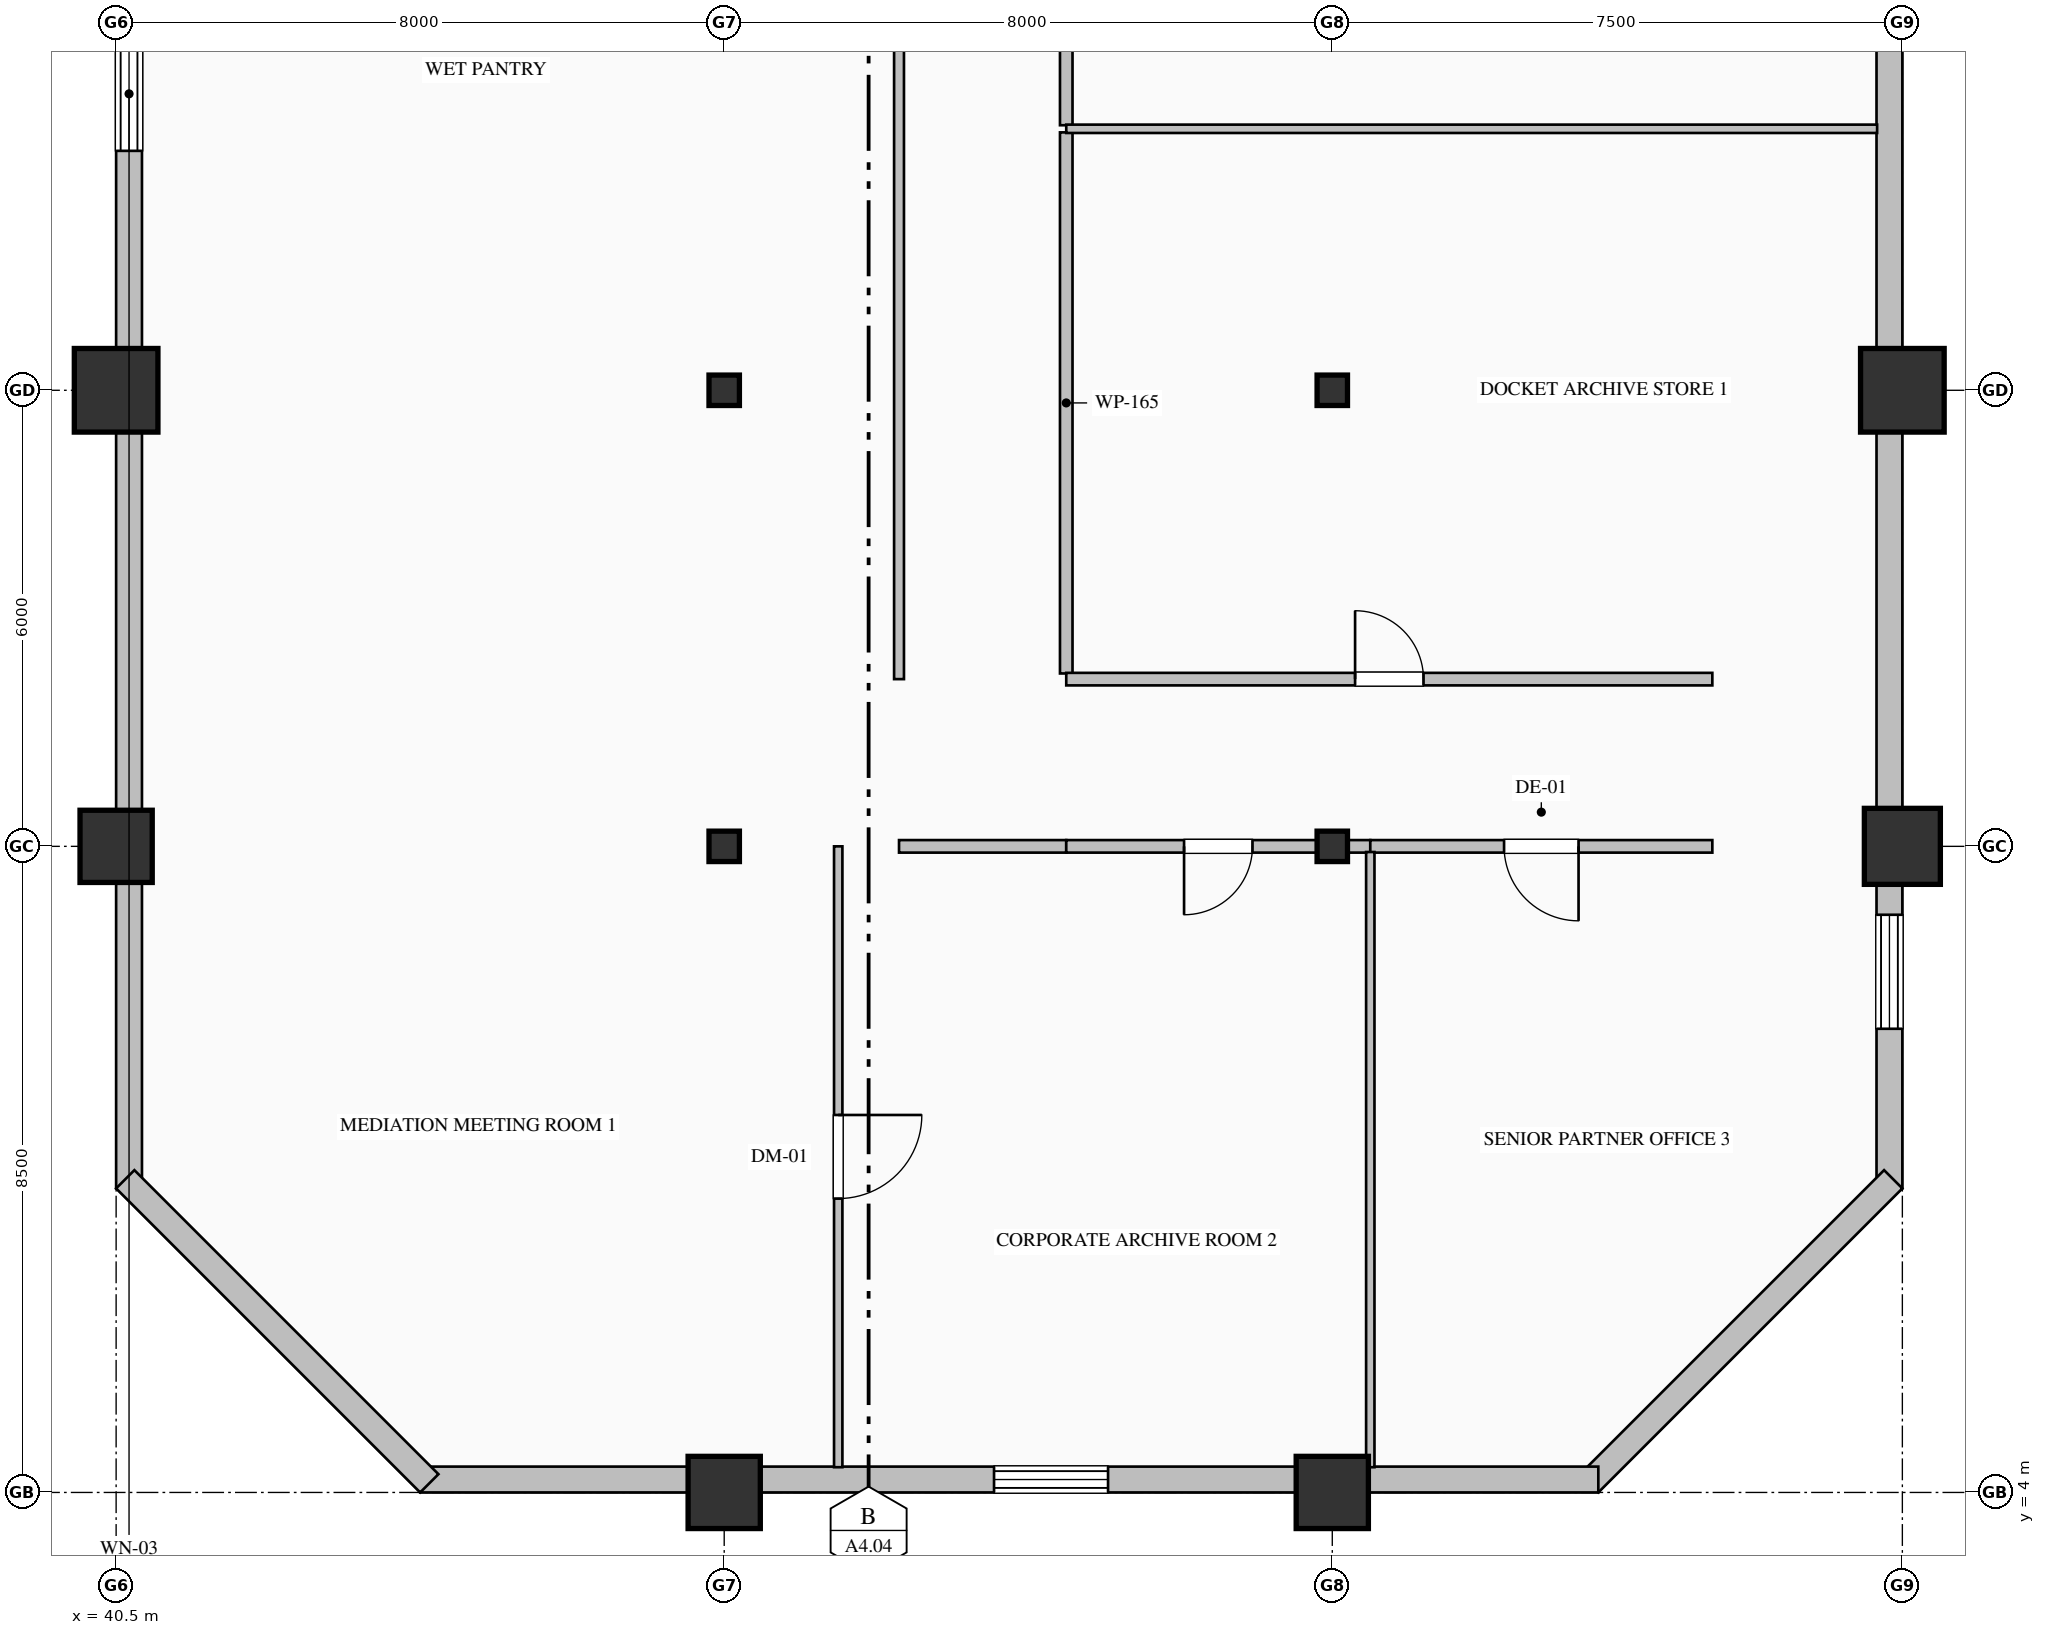
"""IFC4 building model, lengths in metres.
Left out: names, types, materials, properties, quantities, classifications, styles, units other than length and angle.
Written with IfcOpenShell. Run it as: python <this file> out.ifc"""

import sys

from ifc_helpers import new_model, si_unit, direction, frame, frame_2d, origin, origin_2d, place, context, subcontext, project, spatial, rectangle, hollow_rectangle, hollow_circle, i_section, extrude, element, fill, save


model = new_model("IFC4")
c1 = context("Model", 3, precision=1e-05, world=origin(), true_north=direction((0.0, 1.0)))
c2 = subcontext(c1, "Body", "Model", "MODEL_VIEW")
j1 = project(units=[si_unit("LENGTHUNIT", "METRE"), si_unit("PLANEANGLEUNIT", "RADIAN")], contexts=[c1])
p1 = place(None, origin())
s1 = spatial("IfcSite", under=j1, at=p1, CompositionType="ELEMENT")
p2 = place(p1, origin())
s2 = spatial("IfcBuilding", under=s1, at=p2, CompositionType="ELEMENT")
p3 = place(p2, frame((0.0, 0.0, 187.0)))
s3 = spatial("IfcBuildingStorey", under=s2, at=p3, CompositionType="ELEMENT", Elevation=187.0)
p4 = place(p3, frame((40.5, 12.5, 0.0), z_axis=(0.0, 0.0, 1.0), x_axis=(1.0, 0.0, 0.0)))
e1 = element("IfcColumn", 1, at=p4, inside=s3, PredefinedType="COLUMN", context=c2, shape_type="SweptSolid", body=[
    extrude(hollow_rectangle(XDim=0.95, YDim=0.95, WallThickness=0.036, at=origin_2d()), origin(), (0.0, 0.0, 1.0), 4.0),
])
p5 = place(p3, frame((40.5, 18.5, 0.0), z_axis=(0.0, 0.0, 1.0), x_axis=(1.0, 0.0, 0.0)))
e2 = element("IfcColumn", 2, at=p5, inside=s3, PredefinedType="COLUMN", context=c2, shape_type="SweptSolid", body=[
    extrude(hollow_rectangle(XDim=1.1, YDim=1.1, WallThickness=0.04, at=origin_2d()), origin(), (0.0, 0.0, 1.0), 4.0),
])
p6 = place(p3, frame((48.5, 4.0, 0.0), z_axis=(0.0, 0.0, 1.0), x_axis=(1.0, 0.0, 0.0)))
e3 = element("IfcColumn", 3, at=p6, inside=s3, PredefinedType="COLUMN", context=c2, shape_type="SweptSolid", body=[
    extrude(hollow_rectangle(XDim=0.95, YDim=0.95, WallThickness=0.036, at=origin_2d()), origin(), (0.0, 0.0, 1.0), 4.0),
])
for number, where, z_axis, x_axis in (
    (4, (48.5, 12.5, 0.0), (0.0, 0.0, 1.0), (1.0, 0.0, 0.0)),
    (5, (48.5, 18.5, 0.0), (0.0, 0.0, 1.0), (1.0, 0.0, 0.0)),
):
    element("IfcColumn", number, at=place(p3, frame(where, z_axis=z_axis, x_axis=x_axis)), inside=s3, PredefinedType="COLUMN", context=c2, shape_type="SweptSolid", body=[
        extrude(i_section(OverallWidth=0.4, OverallDepth=0.4, WebThickness=0.013, FlangeThickness=0.021, FilletRadius=0.022, at=origin_2d()), origin(), (0.0, 0.0, 1.0), 4.0),
    ])
p7 = place(p3, frame((56.5, 4.0, 0.0), z_axis=(0.0, 0.0, 1.0), x_axis=(1.0, 0.0, 0.0)))
e6 = element("IfcColumn", 6, at=p7, inside=s3, PredefinedType="COLUMN", context=c2, shape_type="SweptSolid", body=[
    extrude(hollow_rectangle(XDim=0.95, YDim=0.95, WallThickness=0.036, at=origin_2d()), origin(), (0.0, 0.0, 1.0), 4.0),
])
for number, where, z_axis, x_axis in (
    (7, (56.5, 12.5, 0.0), (0.0, 0.0, 1.0), (1.0, 0.0, 0.0)),
    (8, (56.5, 18.5, 0.0), (0.0, 0.0, 1.0), (1.0, 0.0, 0.0)),
):
    element("IfcColumn", number, at=place(p3, frame(where, z_axis=z_axis, x_axis=x_axis)), inside=s3, PredefinedType="COLUMN", context=c2, shape_type="SweptSolid", body=[
        extrude(i_section(OverallWidth=0.4, OverallDepth=0.4, WebThickness=0.013, FlangeThickness=0.021, FilletRadius=0.022, at=origin_2d()), origin(), (0.0, 0.0, 1.0), 4.0),
    ])
p8 = place(p3, frame((64.0, 12.5, 0.0), z_axis=(0.0, 0.0, 1.0), x_axis=(1.0, 0.0, 0.0)))
e9 = element("IfcColumn", 9, at=p8, inside=s3, PredefinedType="COLUMN", context=c2, shape_type="SweptSolid", body=[
    extrude(hollow_circle(Radius=0.5, WallThickness=0.036, at=origin_2d()), origin(), (0.0, 0.0, 1.0), 4.0),
])
p9 = place(p3, frame((64.0, 18.5, 0.0), z_axis=(0.0, 0.0, 1.0), x_axis=(1.0, 0.0, 0.0)))
e10 = element("IfcColumn", 10, at=p9, inside=s3, PredefinedType="COLUMN", context=c2, shape_type="SweptSolid", body=[
    extrude(hollow_rectangle(XDim=1.1, YDim=1.1, WallThickness=0.04, at=origin_2d()), origin(), (0.0, 0.0, 1.0), 4.0),
])
p10 = place(p3, frame((40.67, 8.0, 0.0), z_axis=(0.0, 0.0, 1.0), x_axis=(0.0, 1.0, 0.0)))
e11 = element("IfcWall", 11, at=p10, inside=s3, PredefinedType="SOLIDWALL", context=c2, shape_type="SweptSolid", body=[
    extrude(rectangle(XDim=20.34, YDim=0.34, at=frame_2d((10.17, 0.0))), origin(), (0.0, 0.0, 1.0), 3.165),
])
p11 = place(p10, frame((13.65, 0.0, 0.85)))
e12 = element("IfcOpeningElement", 12, at=p11, cuts=e11, PredefinedType="OPENING", context=c2, shape_type="SweptSolid", body=[
    extrude(rectangle(XDim=1.5, YDim=1.95, at=frame_2d((0.75, 0.975))), frame((0.0, 0.18, 0.0), z_axis=(0.0, -1.0, 0.0), x_axis=(1.0, 0.0, 0.0)), (0.0, 0.0, 1.0), 0.36),
])
p12 = place(p3, frame((63.83, 36.05, 0.0), z_axis=(0.0, 0.0, 1.0), x_axis=(0.0, -1.0, 0.0)))
e13 = element("IfcWall", 13, at=p12, inside=s3, PredefinedType="SOLIDWALL", context=c2, shape_type="SweptSolid", body=[
    extrude(rectangle(XDim=28.05, YDim=0.34, at=frame_2d((14.025, 0.0))), origin(), (0.0, 0.0, 1.0), 3.265),
])
p13 = place(p12, frame((2.85, 0.0, 0.85)))
e14 = element("IfcOpeningElement", 14, at=p13, cuts=e13, PredefinedType="OPENING", context=c2, shape_type="SweptSolid", body=[
    extrude(rectangle(XDim=1.5, YDim=1.95, at=frame_2d((0.75, 0.975))), frame((0.0, 0.18, 0.0), z_axis=(0.0, -1.0, 0.0), x_axis=(1.0, 0.0, 0.0)), (0.0, 0.0, 1.0), 0.36),
])
p14 = place(p12, frame((10.2, 0.0, 0.7)))
e15 = element("IfcOpeningElement", 15, at=p14, cuts=e13, PredefinedType="OPENING", context=c2, shape_type="SweptSolid", body=[
    extrude(rectangle(XDim=1.2, YDim=1.85, at=frame_2d((0.6, 0.925))), frame((0.0, 0.18, 0.0), z_axis=(0.0, -1.0, 0.0), x_axis=(1.0, 0.0, 0.0)), (0.0, 0.0, 1.0), 0.36),
])
p15 = place(p12, frame((24.45, 0.0, 0.85)))
e16 = element("IfcOpeningElement", 16, at=p15, cuts=e13, PredefinedType="OPENING", context=c2, shape_type="SweptSolid", body=[
    extrude(rectangle(XDim=1.5, YDim=1.95, at=frame_2d((0.75, 0.975))), frame((0.0, 0.18, 0.0), z_axis=(0.0, -1.0, 0.0), x_axis=(1.0, 0.0, 0.0)), (0.0, 0.0, 1.0), 0.36),
])
p16 = place(p3, frame((63.88, 8.12, 0.0), z_axis=(0.0, 0.0, 1.0), x_axis=(-0.707106781187, -0.707106781187, 0.0)))
e17 = element("IfcWall", 17, at=p16, inside=s3, PredefinedType="SOLIDWALL", context=c2, shape_type="SweptSolid", body=[
    extrude(rectangle(XDim=5.657, YDim=0.34, at=frame_2d((2.828, 0.0))), origin(), (0.0, 0.0, 1.0), 3.765),
])
p17 = place(p3, frame((60.0, 4.17, 0.0), z_axis=(0.0, 0.0, 1.0), x_axis=(-1.0, 0.0, 0.0)))
e18 = element("IfcWall", 18, at=p17, inside=s3, PredefinedType="SOLIDWALL", context=c2, shape_type="SweptSolid", body=[
    extrude(rectangle(XDim=15.5, YDim=0.34, at=frame_2d((7.75, 0.0))), origin(), (0.0, 0.0, 1.0), 3.265),
])
p18 = place(p17, frame((6.45, 0.0, 0.85)))
e19 = element("IfcOpeningElement", 19, at=p18, cuts=e18, PredefinedType="OPENING", context=c2, shape_type="SweptSolid", body=[
    extrude(rectangle(XDim=1.5, YDim=1.95, at=frame_2d((0.75, 0.975))), frame((0.0, 0.18, 0.0), z_axis=(0.0, -1.0, 0.0), x_axis=(1.0, 0.0, 0.0)), (0.0, 0.0, 1.0), 0.36),
])
p19 = place(p3, frame((44.62, 4.12, 0.0), z_axis=(0.0, 0.0, 1.0), x_axis=(-0.707106781187, 0.707106781187, 0.0)))
e20 = element("IfcWall", 20, at=p19, inside=s3, PredefinedType="SOLIDWALL", context=c2, shape_type="SweptSolid", body=[
    extrude(rectangle(XDim=5.657, YDim=0.34, at=frame_2d((2.828, 0.0))), origin(), (0.0, 0.0, 1.0), 3.765),
])
p20 = place(p3, frame((53.0, 21.893, 0.0), z_axis=(0.0, 0.0, 1.0), x_axis=(0.0, -1.0, 0.0)))
e21 = element("IfcWall", 21, at=p20, inside=s3, PredefinedType="PARTITIONING", context=c2, shape_type="SweptSolid", body=[
    extrude(rectangle(XDim=7.119, YDim=0.165, at=frame_2d((3.559, 0.0))), origin(), (0.0, 0.0, 1.0), 3.765),
])
p21 = place(p3, frame((53.0, 28.923, 0.0), z_axis=(0.0, 0.0, 1.0), x_axis=(0.0, -1.0, 0.0)))
e22 = element("IfcWall", 22, at=p21, inside=s3, PredefinedType="PARTITIONING", context=c2, shape_type="SweptSolid", body=[
    extrude(rectangle(XDim=6.936, YDim=0.165, at=frame_2d((3.468, 0.0))), origin(), (0.0, 0.0, 1.0), 3.765),
])
p22 = place(p21, frame((3.018, 0.0, 0.0)))
e23 = element("IfcOpeningElement", 23, at=p22, cuts=e22, PredefinedType="OPENING", context=c2, shape_type="SweptSolid", body=[
    extrude(rectangle(XDim=0.9, YDim=2.15, at=frame_2d((0.45, 1.075))), frame((0.0, 0.093, 0.0), z_axis=(0.0, -1.0, 0.0), x_axis=(1.0, 0.0, 0.0)), (0.0, 0.0, 1.0), 0.185),
])
p23 = place(p3, frame((50.8, 14.7, 0.0), z_axis=(0.0, 0.0, 1.0), x_axis=(0.0, 1.0, 0.0)))
e24 = element("IfcWall", 24, at=p23, inside=s3, PredefinedType="PARTITIONING", context=c2, shape_type="SweptSolid", body=[
    extrude(rectangle(XDim=18.843, YDim=0.13, at=frame_2d((9.421, 0.0))), origin(), (0.0, 0.0, 1.0), 3.765),
])
p24 = place(p23, frame((8.921, 0.0, 0.0)))
e25 = element("IfcOpeningElement", 25, at=p24, cuts=e24, PredefinedType="OPENING", context=c2, shape_type="SweptSolid", body=[
    extrude(rectangle(XDim=1.0, YDim=2.15, at=frame_2d((0.5, 1.075))), frame((0.0, 0.075, 0.0), z_axis=(0.0, -1.0, 0.0), x_axis=(1.0, 0.0, 0.0)), (0.0, 0.0, 1.0), 0.15),
])
p25 = place(p3, frame((53.0, 12.5, 0.0), z_axis=(0.0, 0.0, 1.0), x_axis=(-1.0, 0.0, 0.0)))
e26 = element("IfcWall", 26, at=p25, inside=s3, PredefinedType="PARTITIONING", context=c2, shape_type="SweptSolid", body=[
    extrude(rectangle(XDim=2.2, YDim=0.165, at=frame_2d((1.1, 0.0))), origin(), (0.0, 0.0, 1.0), 3.157),
])
p26 = place(p3, frame((53.0, 14.7, 0.0), z_axis=(0.0, 0.0, 1.0), x_axis=(1.0, 0.0, 0.0)))
e27 = element("IfcWall", 27, at=p26, inside=s3, PredefinedType="PARTITIONING", context=c2, shape_type="SweptSolid", body=[
    extrude(rectangle(XDim=8.5, YDim=0.165, at=frame_2d((4.25, 0.0))), origin(), (0.0, 0.0, 1.0), 3.765),
])
p27 = place(p26, frame((3.8, 0.0, 0.0)))
e28 = element("IfcOpeningElement", 28, at=p27, cuts=e27, PredefinedType="OPENING", context=c2, shape_type="SweptSolid", body=[
    extrude(rectangle(XDim=0.9, YDim=2.15, at=frame_2d((0.45, 1.075))), frame((0.0, 0.093, 0.0), z_axis=(0.0, -1.0, 0.0), x_axis=(1.0, 0.0, 0.0)), (0.0, 0.0, 1.0), 0.185),
])
p28 = place(p3, frame((57.0, 12.5, 0.0), z_axis=(0.0, 0.0, 1.0), x_axis=(-1.0, 0.0, 0.0)))
e29 = element("IfcWall", 29, at=p28, inside=s3, PredefinedType="PARTITIONING", context=c2, shape_type="SweptSolid", body=[
    extrude(rectangle(XDim=4.0, YDim=0.165, at=frame_2d((2.0, 0.0))), origin(), (0.0, 0.0, 1.0), 3.157),
])
p29 = place(p28, frame((1.55, 0.0, 0.0)))
e30 = element("IfcOpeningElement", 30, at=p29, cuts=e29, PredefinedType="OPENING", context=c2, shape_type="SweptSolid", body=[
    extrude(rectangle(XDim=0.9, YDim=2.15, at=frame_2d((0.45, 1.075))), frame((0.0, 0.093, 0.0), z_axis=(0.0, -1.0, 0.0), x_axis=(1.0, 0.0, 0.0)), (0.0, 0.0, 1.0), 0.185),
])
p30 = place(p3, frame((61.5, 12.5, 0.0), z_axis=(0.0, 0.0, 1.0), x_axis=(-1.0, 0.0, 0.0)))
e31 = element("IfcWall", 31, at=p30, inside=s3, PredefinedType="PARTITIONING", context=c2, shape_type="SweptSolid", body=[
    extrude(rectangle(XDim=4.5, YDim=0.165, at=frame_2d((2.25, 0.0))), origin(), (0.0, 0.0, 1.0), 3.157),
])
p31 = place(p30, frame((1.76, 0.0, 0.0)))
e32 = element("IfcOpeningElement", 32, at=p31, cuts=e31, PredefinedType="OPENING", context=c2, shape_type="SweptSolid", body=[
    extrude(rectangle(XDim=0.98, YDim=2.25, at=frame_2d((0.49, 1.125))), frame((0.0, 0.093, 0.0), z_axis=(0.0, -1.0, 0.0), x_axis=(1.0, 0.0, 0.0)), (0.0, 0.0, 1.0), 0.185),
])
p32 = place(p3, frame((53.0, 21.94, 0.0), z_axis=(0.0, 0.0, 1.0), x_axis=(1.0, 0.0, 0.0)))
e33 = element("IfcWall", 33, at=p32, inside=s3, PredefinedType="MOVABLE", context=c2, shape_type="SweptSolid", body=[
    extrude(rectangle(XDim=10.668, YDim=0.11, at=frame_2d((5.334, 0.0))), origin(), (0.0, 0.0, 1.0), 3.765),
])
p33 = place(p3, frame((50.0, 12.5, 0.0), z_axis=(0.0, 0.0, 1.0), x_axis=(0.0, -1.0, 0.0)))
e34 = element("IfcWall", 34, at=p33, inside=s3, PredefinedType="MOVABLE", context=c2, shape_type="SweptSolid", body=[
    extrude(rectangle(XDim=8.168, YDim=0.11, at=frame_2d((4.084, 0.0))), origin(), (0.0, 0.0, 1.0), 3.765),
])
p34 = place(p33, frame((3.534, 0.0, 0.0)))
e35 = element("IfcOpeningElement", 35, at=p34, cuts=e34, PredefinedType="OPENING", context=c2, shape_type="SweptSolid", body=[
    extrude(rectangle(XDim=1.1, YDim=2.2, at=frame_2d((0.55, 1.1))), frame((0.0, 0.065, 0.0), z_axis=(0.0, -1.0, 0.0), x_axis=(1.0, 0.0, 0.0)), (0.0, 0.0, 1.0), 0.13),
])
p35 = place(p3, frame((57.0, 12.426, 0.0), z_axis=(0.0, 0.0, 1.0), x_axis=(0.0, -1.0, 0.0)))
e36 = element("IfcWall", 36, at=p35, inside=s3, PredefinedType="MOVABLE", context=c2, shape_type="SweptSolid", body=[
    extrude(rectangle(XDim=8.094, YDim=0.11, at=frame_2d((4.047, 0.0))), origin(), (0.0, 0.0, 1.0), 3.765),
])
p36 = place(p11, origin())
e37 = element("IfcWindow", 37, at=p36, inside=s3, PartitioningType="DOUBLE_PANEL_VERTICAL", PredefinedType="WINDOW", context=c2, shape_type="SweptSolid", body=[
    extrude(rectangle(XDim=1.5, YDim=1.95, at=frame_2d((0.75, 0.975))), frame((0.0, 0.15, 0.0), z_axis=(0.0, -1.0, 0.0), x_axis=(1.0, 0.0, 0.0)), (0.0, 0.0, 1.0), 0.06),
])
fill(e12, e37)
p37 = place(p15, origin())
e38 = element("IfcWindow", 38, at=p37, inside=s3, PartitioningType="DOUBLE_PANEL_VERTICAL", PredefinedType="WINDOW", context=c2, shape_type="SweptSolid", body=[
    extrude(rectangle(XDim=1.5, YDim=1.95, at=frame_2d((0.75, 0.975))), frame((0.0, 0.15, 0.0), z_axis=(0.0, -1.0, 0.0), x_axis=(1.0, 0.0, 0.0)), (0.0, 0.0, 1.0), 0.06),
])
fill(e16, e38)
p38 = place(p18, origin())
e39 = element("IfcWindow", 39, at=p38, inside=s3, PartitioningType="DOUBLE_PANEL_VERTICAL", PredefinedType="WINDOW", context=c2, shape_type="SweptSolid", body=[
    extrude(rectangle(XDim=1.5, YDim=1.95, at=frame_2d((0.75, 0.975))), frame((0.0, 0.15, 0.0), z_axis=(0.0, -1.0, 0.0), x_axis=(1.0, 0.0, 0.0)), (0.0, 0.0, 1.0), 0.06),
])
fill(e19, e39)
p39 = place(p27, origin())
e40 = element("IfcDoor", 40, at=p39, inside=s3, OperationType="SINGLE_SWING_LEFT", PredefinedType="DOOR", context=c2, shape_type="SweptSolid", body=[
    extrude(rectangle(XDim=0.9, YDim=2.15, at=frame_2d((0.45, 1.075))), frame((0.0, 0.025, 0.0), z_axis=(0.0, -1.0, 0.0), x_axis=(1.0, 0.0, 0.0)), (0.0, 0.0, 1.0), 0.05),
])
fill(e28, e40)
p40 = place(p34, origin())
e41 = element("IfcDoor", 41, at=p40, inside=s3, OperationType="SINGLE_SWING_LEFT", PredefinedType="DOOR", context=c2, shape_type="SweptSolid", body=[
    extrude(rectangle(XDim=1.1, YDim=2.2, at=frame_2d((0.55, 1.1))), frame((0.0, 0.025, 0.0), z_axis=(0.0, -1.0, 0.0), x_axis=(1.0, 0.0, 0.0)), (0.0, 0.0, 1.0), 0.05),
])
fill(e35, e41)
p41 = place(p29, origin())
e42 = element("IfcDoor", 42, at=p41, inside=s3, OperationType="SINGLE_SWING_RIGHT", PredefinedType="DOOR", context=c2, shape_type="SweptSolid", body=[
    extrude(rectangle(XDim=0.9, YDim=2.15, at=frame_2d((0.45, 1.075))), frame((0.0, 0.025, 0.0), z_axis=(0.0, -1.0, 0.0), x_axis=(1.0, 0.0, 0.0)), (0.0, 0.0, 1.0), 0.05),
])
fill(e30, e42)
p42 = place(p31, origin())
e43 = element("IfcDoor", 43, at=p42, inside=s3, OperationType="SINGLE_SWING_LEFT", PredefinedType="DOOR", context=c2, shape_type="SweptSolid", body=[
    extrude(rectangle(XDim=0.98, YDim=2.25, at=frame_2d((0.49, 1.125))), frame((0.0, 0.025, 0.0), z_axis=(0.0, -1.0, 0.0), x_axis=(1.0, 0.0, 0.0)), (0.0, 0.0, 1.0), 0.05),
])
fill(e32, e43)
save(model, sys.argv[1])
